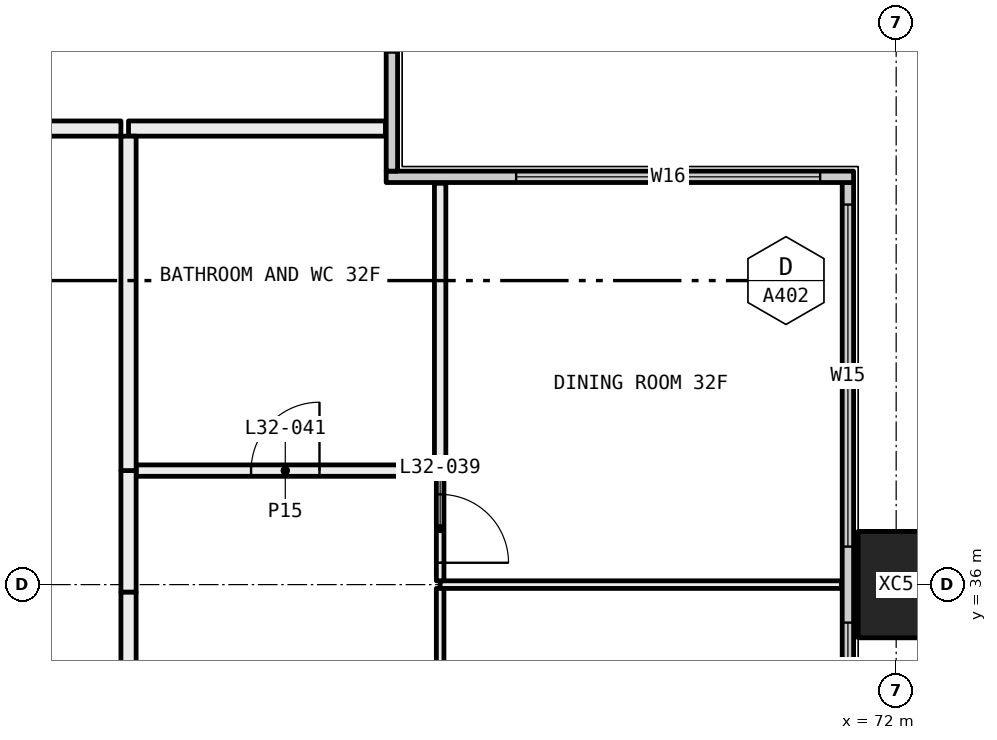
"""IFC4 building model, lengths in metres.
Left out: names, types, materials, properties, quantities, classifications, styles, units other than length and angle.
Written with IfcOpenShell. Run it as: python <this file> out.ifc"""

import sys

from ifc_helpers import new_model, si_unit, direction, frame, frame_2d, origin, origin_2d, place, context, subcontext, project, spatial, rectangle, hollow_rectangle, extrude, element, fill, save


model = new_model("IFC4")
c1 = context("Model", 3, precision=1e-05, world=origin(), true_north=direction((0.0, 1.0)))
c2 = subcontext(c1, "Body", "Model", "MODEL_VIEW")
j1 = project(units=[si_unit("LENGTHUNIT", "METRE"), si_unit("PLANEANGLEUNIT", "RADIAN")], contexts=[c1])
p1 = place(None, origin())
s1 = spatial("IfcSite", under=j1, at=p1, CompositionType="ELEMENT")
p2 = place(p1, origin())
s2 = spatial("IfcBuilding", under=s1, at=p2, CompositionType="ELEMENT")
p3 = place(p2, frame((0.0, 0.0, 124.2)))
s3 = spatial("IfcBuildingStorey", under=s2, at=p3, CompositionType="ELEMENT", Elevation=124.2)
p4 = place(p3, frame((72.0, 36.0, -0.4), z_axis=(0.0, 0.0, 1.0), x_axis=(0.0, 1.0, 0.0)))
e1 = element("IfcColumn", 1, at=p4, inside=s3, PredefinedType="COLUMN", context=c2, shape_type="SweptSolid", body=[
    extrude(hollow_rectangle(XDim=1.4, YDim=1.0, WallThickness=0.055, at=origin_2d()), origin(), (0.0, 0.0, 1.0), 3.45),
])
p5 = place(p3, frame((71.365, 18.71, 0.0), z_axis=(0.0, 0.0, 1.0), x_axis=(0.0, 1.0, 0.0)))
e2 = element("IfcWall", 2, at=p5, inside=s3, PredefinedType="ELEMENTEDWALL", context=c2, shape_type="SweptSolid", body=[
    extrude(rectangle(XDim=22.58, YDim=0.15, at=frame_2d((11.29, 0.0))), origin(), (0.0, 0.0, 1.0), 3.05),
])
p6 = place(p5, frame((0.29, 0.0, 0.45)))
e3 = element("IfcOpeningElement", 3, at=p6, cuts=e2, PredefinedType="OPENING", context=c2, shape_type="SweptSolid", body=[
    extrude(rectangle(XDim=4.5, YDim=2.55, at=frame_2d((2.25, 1.275))), frame((0.0, 0.085, 0.0), z_axis=(0.0, -1.0, 0.0), x_axis=(1.0, 0.0, 0.0)), (0.0, 0.0, 1.0), 0.17),
])
p7 = place(p5, frame((5.79, 0.0, 0.45)))
e4 = element("IfcOpeningElement", 4, at=p7, cuts=e2, PredefinedType="OPENING", context=c2, shape_type="SweptSolid", body=[
    extrude(rectangle(XDim=1.25, YDim=2.55, at=frame_2d((0.625, 1.275))), frame((0.0, 0.085, 0.0), z_axis=(0.0, -1.0, 0.0), x_axis=(1.0, 0.0, 0.0)), (0.0, 0.0, 1.0), 0.17),
])
p8 = place(p5, frame((10.04, 0.0, 0.45)))
e5 = element("IfcOpeningElement", 5, at=p8, cuts=e2, PredefinedType="OPENING", context=c2, shape_type="SweptSolid", body=[
    extrude(rectangle(XDim=0.75, YDim=2.55, at=frame_2d((0.375, 1.275))), frame((0.0, 0.085, 0.0), z_axis=(0.0, -1.0, 0.0), x_axis=(1.0, 0.0, 0.0)), (0.0, 0.0, 1.0), 0.17),
])
p9 = place(p5, frame((11.79, 0.0, 0.45)))
e6 = element("IfcOpeningElement", 6, at=p9, cuts=e2, PredefinedType="OPENING", context=c2, shape_type="SweptSolid", body=[
    extrude(rectangle(XDim=0.75, YDim=2.55, at=frame_2d((0.375, 1.275))), frame((0.0, 0.085, 0.0), z_axis=(0.0, -1.0, 0.0), x_axis=(1.0, 0.0, 0.0)), (0.0, 0.0, 1.0), 0.17),
])
p10 = place(p5, frame((15.54, 0.0, 0.45)))
e7 = element("IfcOpeningElement", 7, at=p10, cuts=e2, PredefinedType="OPENING", context=c2, shape_type="SweptSolid", body=[
    extrude(rectangle(XDim=1.25, YDim=2.55, at=frame_2d((0.625, 1.275))), frame((0.0, 0.085, 0.0), z_axis=(0.0, -1.0, 0.0), x_axis=(1.0, 0.0, 0.0)), (0.0, 0.0, 1.0), 0.17),
])
p11 = place(p5, frame((17.79, 0.0, 0.45)))
e8 = element("IfcOpeningElement", 8, at=p11, cuts=e2, PredefinedType="OPENING", context=c2, shape_type="SweptSolid", body=[
    extrude(rectangle(XDim=4.5, YDim=2.55, at=frame_2d((2.25, 1.275))), frame((0.0, 0.085, 0.0), z_axis=(0.0, -1.0, 0.0), x_axis=(1.0, 0.0, 0.0)), (0.0, 0.0, 1.0), 0.17),
])
p12 = place(p3, frame((65.29, 41.365, 0.0), z_axis=(0.0, 0.0, 1.0), x_axis=(1.0, 0.0, 0.0)))
e9 = element("IfcWall", 9, at=p12, inside=s3, PredefinedType="ELEMENTEDWALL", context=c2, shape_type="SweptSolid", body=[
    extrude(rectangle(XDim=6.15, YDim=0.15, at=frame_2d((3.075, 0.0))), origin(), (0.0, 0.0, 1.0), 3.05),
])
p13 = place(p12, frame((1.71, 0.0, 0.45)))
e10 = element("IfcOpeningElement", 10, at=p13, cuts=e9, PredefinedType="OPENING", context=c2, shape_type="SweptSolid", body=[
    extrude(rectangle(XDim=4.0, YDim=2.55, at=frame_2d((2.0, 1.275))), frame((0.0, 0.085, 0.0), z_axis=(0.0, -1.0, 0.0), x_axis=(1.0, 0.0, 0.0)), (0.0, 0.0, 1.0), 0.17),
])
p14 = place(p3, frame((65.365, 41.44, 0.0), z_axis=(0.0, 0.0, 1.0), x_axis=(0.0, 1.0, 0.0)))
e11 = element("IfcWall", 11, at=p14, inside=s3, PredefinedType="ELEMENTEDWALL", context=c2, shape_type="SweptSolid", body=[
    extrude(rectangle(XDim=5.85, YDim=0.15, at=frame_2d((2.925, 0.0))), origin(), (0.0, 0.0, 1.0), 3.05),
])
p15 = place(p14, frame((1.56, 0.0, 0.45)))
e12 = element("IfcOpeningElement", 12, at=p15, cuts=e11, PredefinedType="OPENING", context=c2, shape_type="SweptSolid", body=[
    extrude(rectangle(XDim=4.0, YDim=2.55, at=frame_2d((2.0, 1.275))), frame((0.0, 0.085, 0.0), z_axis=(0.0, -1.0, 0.0), x_axis=(1.0, 0.0, 0.0)), (0.0, 0.0, 1.0), 0.17),
])
p16 = place(p3, frame((71.28, 36.0, 0.0), z_axis=(0.0, 0.0, 1.0), x_axis=(-1.0, 0.0, 0.0)))
e13 = element("IfcWall", 13, at=p16, inside=s3, PredefinedType="PARTITIONING", context=c2, shape_type="SweptSolid", body=[
    extrude(rectangle(XDim=5.28, YDim=0.1, at=frame_2d((2.64, 0.0))), origin(), (0.0, 0.0, 1.0), 2.45),
])
p17 = place(p3, frame((66.0, 35.95, 0.0), z_axis=(0.0, 0.0, 1.0), x_axis=(0.0, -1.0, 0.0)))
e14 = element("IfcWall", 14, at=p17, inside=s3, PredefinedType="PARTITIONING", context=c2, shape_type="SweptSolid", body=[
    extrude(rectangle(XDim=5.9, YDim=0.1, at=frame_2d((2.95, 0.0))), origin(), (0.0, 0.0, 1.0), 2.45),
])
p18 = place(p3, frame((66.0, 37.425, 0.0), z_axis=(0.0, 0.0, 1.0), x_axis=(0.0, -1.0, 0.0)))
e15 = element("IfcWall", 15, at=p18, inside=s3, PredefinedType="PARTITIONING", context=c2, shape_type="SweptSolid", body=[
    extrude(rectangle(XDim=1.375, YDim=0.1, at=frame_2d((0.688, 0.0))), origin(), (0.0, 0.0, 1.0), 2.45),
])
p19 = place(p18, frame((0.238, 0.0, 0.0)))
e16 = element("IfcOpeningElement", 16, at=p19, cuts=e15, PredefinedType="OPENING", context=c2, shape_type="SweptSolid", body=[
    extrude(rectangle(XDim=0.9, YDim=2.1, at=frame_2d((0.45, 1.05))), frame((0.0, 0.06, 0.0), z_axis=(0.0, -1.0, 0.0), x_axis=(1.0, 0.0, 0.0)), (0.0, 0.0, 1.0), 0.12),
])
p20 = place(p3, frame((66.0, 41.28, 0.0), z_axis=(0.0, 0.0, 1.0), x_axis=(0.0, -1.0, 0.0)))
e17 = element("IfcWall", 17, at=p20, inside=s3, PredefinedType="PARTITIONING", context=c2, shape_type="SweptSolid", body=[
    extrude(rectangle(XDim=3.78, YDim=0.15, at=frame_2d((1.89, 0.0))), origin(), (0.0, 0.0, 1.0), 3.05),
])
p21 = place(p3, frame((65.925, 37.5, 0.0), z_axis=(0.0, 0.0, 1.0), x_axis=(-1.0, 0.0, 0.0)))
e18 = element("IfcWall", 18, at=p21, inside=s3, PredefinedType="PARTITIONING", context=c2, shape_type="SweptSolid", body=[
    extrude(rectangle(XDim=3.925, YDim=0.15, at=frame_2d((1.962, 0.0))), origin(), (0.0, 0.0, 1.0), 3.05),
])
p22 = place(p21, frame((1.512, 0.0, 0.0)))
e19 = element("IfcOpeningElement", 19, at=p22, cuts=e18, PredefinedType="OPENING", context=c2, shape_type="SweptSolid", body=[
    extrude(rectangle(XDim=0.9, YDim=2.1, at=frame_2d((0.45, 1.05))), frame((0.0, 0.085, 0.0), z_axis=(0.0, -1.0, 0.0), x_axis=(1.0, 0.0, 0.0)), (0.0, 0.0, 1.0), 0.17),
])
p23 = place(p3, frame((61.9, 37.5, 0.0), z_axis=(0.0, 0.0, 1.0), x_axis=(0.0, -1.0, 0.0)))
e20 = element("IfcWall", 20, at=p23, inside=s3, PredefinedType="PARTITIONING", context=c2, shape_type="SweptSolid", body=[
    extrude(rectangle(XDim=1.6, YDim=0.2, at=frame_2d((0.8, 0.0))), origin(), (0.0, 0.0, 1.0), 2.45),
])
p24 = place(p3, frame((61.9, 35.9, 0.0), z_axis=(0.0, 0.0, 1.0), x_axis=(0.0, -1.0, 0.0)))
e21 = element("IfcWall", 21, at=p24, inside=s3, PredefinedType="PARTITIONING", context=c2, shape_type="SweptSolid", body=[
    extrude(rectangle(XDim=8.9, YDim=0.2, at=frame_2d((4.45, 0.0))), origin(), (0.0, 0.0, 1.0), 3.05),
])
p25 = place(p3, frame((65.28, 42.0, 0.0), z_axis=(0.0, 0.0, 1.0), x_axis=(-1.0, 0.0, 0.0)))
e22 = element("IfcWall", 22, at=p25, inside=s3, PredefinedType="PARTITIONING", context=c2, shape_type="SweptSolid", body=[
    extrude(rectangle(XDim=3.38, YDim=0.2, at=frame_2d((1.69, 0.0))), origin(), (0.0, 0.0, 1.0), 3.05),
])
p26 = place(p3, frame((61.9, 41.9, 0.0), z_axis=(0.0, 0.0, 1.0), x_axis=(0.0, -1.0, 0.0)))
e23 = element("IfcWall", 23, at=p26, inside=s3, PredefinedType="PARTITIONING", context=c2, shape_type="SweptSolid", body=[
    extrude(rectangle(XDim=4.4, YDim=0.2, at=frame_2d((2.2, 0.0))), origin(), (0.0, 0.0, 1.0), 3.05),
])
p27 = place(p3, frame((54.0, 42.0, 0.0), z_axis=(0.0, 0.0, 1.0), x_axis=(1.0, 0.0, 0.0)))
e24 = element("IfcWall", 24, at=p27, inside=s3, PredefinedType="PARTITIONING", context=c2, shape_type="SweptSolid", body=[
    extrude(rectangle(XDim=7.8, YDim=0.2, at=frame_2d((3.9, 0.0))), origin(), (0.0, 0.0, 1.0), 3.05),
])
p28 = place(p10, origin())
e25 = element("IfcWindow", 25, at=p28, inside=s3, PartitioningType="SINGLE_PANEL", PredefinedType="WINDOW", context=c2, shape_type="SweptSolid", body=[
    extrude(rectangle(XDim=1.25, YDim=2.55, at=frame_2d((0.625, 1.275))), frame((0.0, 0.03, 0.0), z_axis=(0.0, -1.0, 0.0), x_axis=(1.0, 0.0, 0.0)), (0.0, 0.0, 1.0), 0.06),
])
fill(e7, e25)
p29 = place(p11, origin())
e26 = element("IfcWindow", 26, at=p29, inside=s3, PartitioningType="SINGLE_PANEL", PredefinedType="WINDOW", context=c2, shape_type="SweptSolid", body=[
    extrude(rectangle(XDim=4.5, YDim=2.55, at=frame_2d((2.25, 1.275))), frame((0.0, 0.03, 0.0), z_axis=(0.0, -1.0, 0.0), x_axis=(1.0, 0.0, 0.0)), (0.0, 0.0, 1.0), 0.06),
])
fill(e8, e26)
p30 = place(p13, origin())
e27 = element("IfcWindow", 27, at=p30, inside=s3, PartitioningType="SINGLE_PANEL", PredefinedType="WINDOW", context=c2, shape_type="SweptSolid", body=[
    extrude(rectangle(XDim=4.0, YDim=2.55, at=frame_2d((2.0, 1.275))), frame((0.0, 0.03, 0.0), z_axis=(0.0, -1.0, 0.0), x_axis=(1.0, 0.0, 0.0)), (0.0, 0.0, 1.0), 0.06),
])
fill(e10, e27)
p31 = place(p19, origin())
e28 = element("IfcDoor", 28, at=p31, inside=s3, OperationType="SINGLE_SWING_LEFT", PredefinedType="DOOR", context=c2, shape_type="SweptSolid", body=[
    extrude(rectangle(XDim=0.9, YDim=2.1, at=frame_2d((0.45, 1.05))), frame((0.0, 0.025, 0.0), z_axis=(0.0, -1.0, 0.0), x_axis=(1.0, 0.0, 0.0)), (0.0, 0.0, 1.0), 0.05),
])
fill(e16, e28)
p32 = place(p22, frame((0.9, 0.0, 0.0), x_axis=(-1.0, 0.0, 0.0)))
e29 = element("IfcDoor", 29, at=p32, inside=s3, OperationType="SINGLE_SWING_LEFT", PredefinedType="DOOR", context=c2, shape_type="SweptSolid", body=[
    extrude(rectangle(XDim=0.9, YDim=2.1, at=frame_2d((0.45, 1.05))), frame((0.0, 0.025, 0.0), z_axis=(0.0, -1.0, 0.0), x_axis=(1.0, 0.0, 0.0)), (0.0, 0.0, 1.0), 0.05),
])
fill(e19, e29)
save(model, sys.argv[1])
